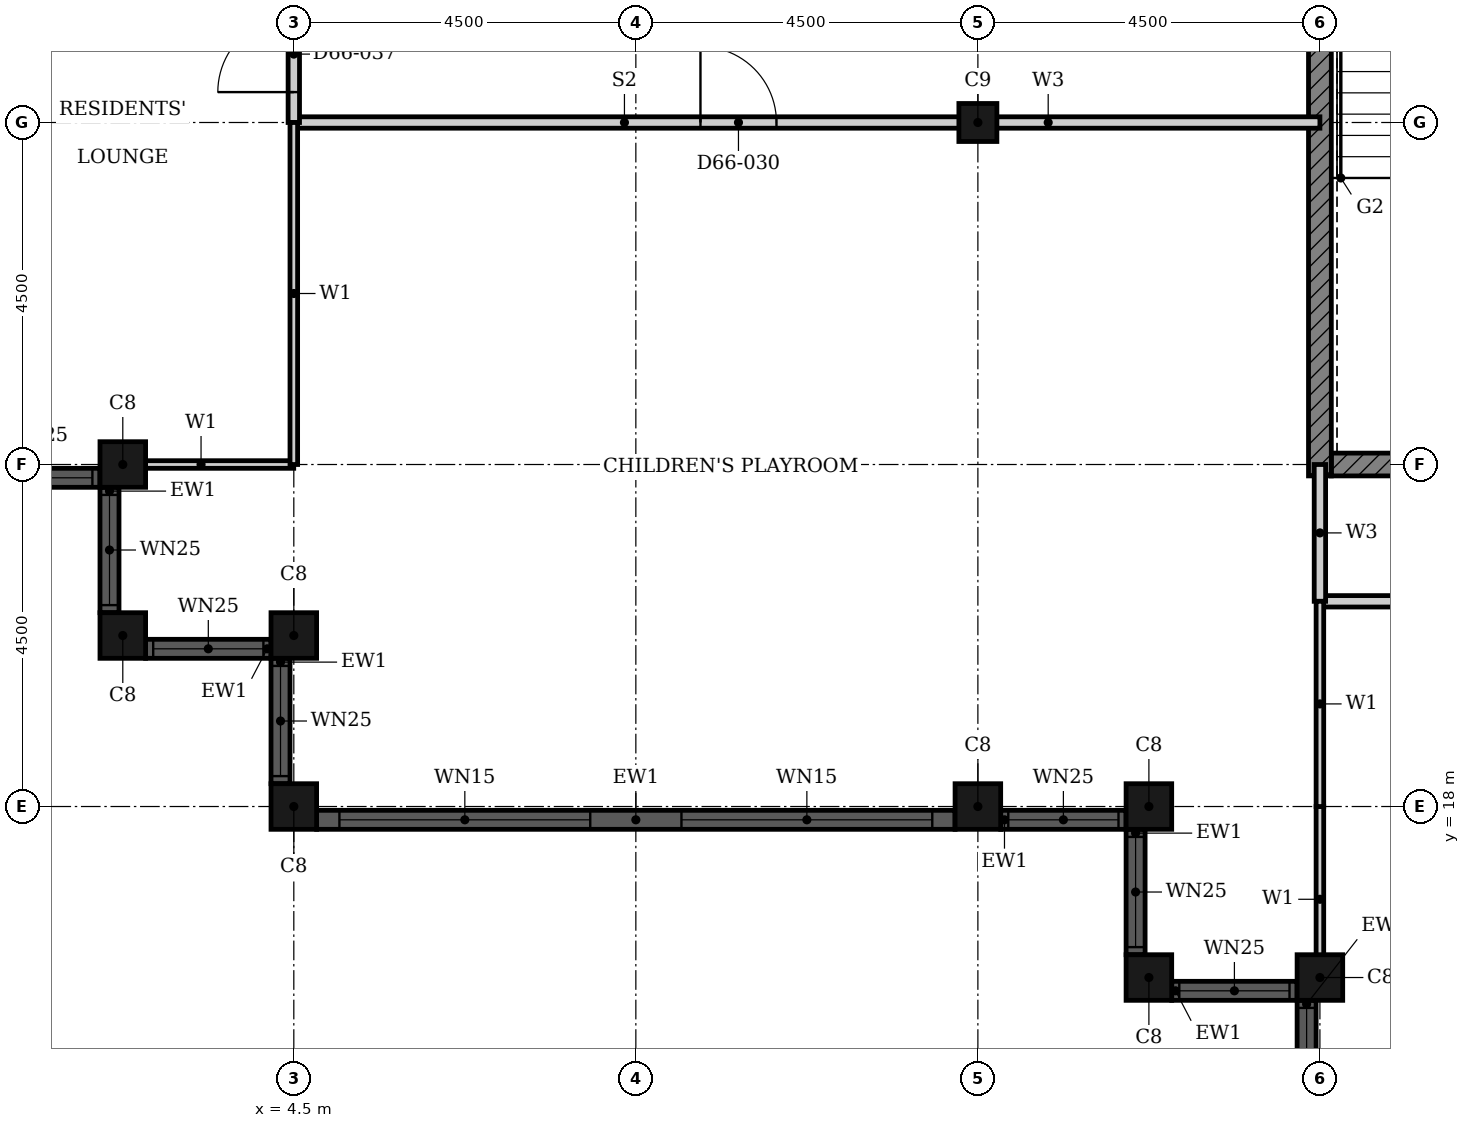
"""IFC4 building model, lengths in metres.
Left out: names, types, materials, properties, quantities, classifications, styles, units other than length and angle.
Written with IfcOpenShell. Run it as: python <this file> out.ifc"""

import sys

from ifc_helpers import new_model, si_unit, direction, frame, frame_2d, origin, origin_2d, place, context, subcontext, project, spatial, rectangle, hollow_rectangle, extrude, element, fill, save


model = new_model("IFC4")
c1 = context("Model", 3, precision=1e-05, world=origin(), true_north=direction((0.0, 1.0)))
c2 = subcontext(c1, "Body", "Model", "MODEL_VIEW")
j1 = project(units=[si_unit("LENGTHUNIT", "METRE"), si_unit("PLANEANGLEUNIT", "RADIAN")], contexts=[c1])
p1 = place(None, origin())
s1 = spatial("IfcSite", under=j1, at=p1, CompositionType="ELEMENT")
p2 = place(p1, origin())
s2 = spatial("IfcBuilding", under=s1, at=p2, CompositionType="ELEMENT")
p3 = place(p2, frame((0.0, 0.0, 260.1)))
s3 = spatial("IfcBuildingStorey", under=s2, at=p3, CompositionType="ELEMENT", Elevation=260.1)
for number, where, z_axis, x_axis in (
    (1, (15.75, 18.0, 0.0), (0.0, 0.0, 1.0), (1.0, 0.0, 0.0)),
    (2, (15.75, 15.75, 0.0), (0.0, 0.0, 1.0), (1.0, 0.0, 0.0)),
    (3, (18.0, 15.75, 0.0), (0.0, 0.0, 1.0), (1.0, 0.0, 0.0)),
    (4, (2.25, 22.5, 0.0), (0.0, 0.0, 1.0), (1.0, 0.0, 0.0)),
    (5, (2.25, 20.25, 0.0), (0.0, 0.0, 1.0), (1.0, 0.0, 0.0)),
    (6, (4.5, 20.25, 0.0), (0.0, 0.0, 1.0), (1.0, 0.0, 0.0)),
    (7, (4.5, 18.0, 0.0), (0.0, 0.0, 1.0), (1.0, 0.0, 0.0)),
    (8, (13.5, 18.0, 0.0), (0.0, 0.0, 1.0), (1.0, 0.0, 0.0)),
):
    element("IfcColumn", number, at=place(p3, frame(where, z_axis=z_axis, x_axis=x_axis)), inside=s3, PredefinedType="COLUMN", context=c2, shape_type="SweptSolid", body=[
        extrude(hollow_rectangle(XDim=0.6, YDim=0.6, WallThickness=0.02, at=origin_2d()), origin(), (0.0, 0.0, 1.0), 3.7),
    ])
p4 = place(p3, frame((13.5, 27.0, 0.0), z_axis=(0.0, 0.0, 1.0), x_axis=(1.0, 0.0, 0.0)))
e9 = element("IfcColumn", 9, at=p4, inside=s3, PredefinedType="COLUMN", context=c2, shape_type="SweptSolid", body=[
    extrude(hollow_rectangle(XDim=0.5, YDim=0.5, WallThickness=0.016, InnerFilletRadius=0.032, OuterFilletRadius=0.048, at=origin_2d()), origin(), (0.0, 0.0, 1.0), 3.7),
])
p5 = place(p3, frame((15.575, 17.7, 0.0), z_axis=(0.0, 0.0, 1.0), x_axis=(0.0, -1.0, 0.0)))
e10 = element("IfcWall", 10, at=p5, inside=s3, PredefinedType="SOLIDWALL", context=c2, shape_type="SweptSolid", body=[
    extrude(rectangle(XDim=1.65, YDim=0.25, at=frame_2d((0.825, 0.0))), origin(), (0.0, 0.0, 1.0), 3.7),
])
p6 = place(p5, frame((0.1, 0.0, 0.9)))
e11 = element("IfcOpeningElement", 11, at=p6, cuts=e10, PredefinedType="OPENING", context=c2, shape_type="SweptSolid", body=[
    extrude(rectangle(XDim=1.45, YDim=1.85, at=frame_2d((0.725, 0.925))), frame((0.0, 0.135, 0.0), z_axis=(0.0, -1.0, 0.0), x_axis=(1.0, 0.0, 0.0)), (0.0, 0.0, 1.0), 0.27),
])
p7 = place(p3, frame((16.05, 15.575, 0.0), z_axis=(0.0, 0.0, 1.0), x_axis=(1.0, 0.0, 0.0)))
e12 = element("IfcWall", 12, at=p7, inside=s3, PredefinedType="SOLIDWALL", context=c2, shape_type="SweptSolid", body=[
    extrude(rectangle(XDim=1.65, YDim=0.25, at=frame_2d((0.825, 0.0))), origin(), (0.0, 0.0, 1.0), 3.7),
])
p8 = place(p7, frame((0.1, 0.0, 0.9)))
e13 = element("IfcOpeningElement", 13, at=p8, cuts=e12, PredefinedType="OPENING", context=c2, shape_type="SweptSolid", body=[
    extrude(rectangle(XDim=1.45, YDim=1.85, at=frame_2d((0.725, 0.925))), frame((0.0, 0.135, 0.0), z_axis=(0.0, -1.0, 0.0), x_axis=(1.0, 0.0, 0.0)), (0.0, 0.0, 1.0), 0.27),
])
p9 = place(p3, frame((17.825, 15.45, 0.0), z_axis=(0.0, 0.0, 1.0), x_axis=(0.0, -1.0, 0.0)))
e14 = element("IfcWall", 14, at=p9, inside=s3, PredefinedType="SOLIDWALL", context=c2, shape_type="SweptSolid", body=[
    extrude(rectangle(XDim=1.65, YDim=0.25, at=frame_2d((0.825, 0.0))), origin(), (0.0, 0.0, 1.0), 3.7),
])
p10 = place(p9, frame((0.1, 0.0, 0.9)))
e15 = element("IfcOpeningElement", 15, at=p10, cuts=e14, PredefinedType="OPENING", context=c2, shape_type="SweptSolid", body=[
    extrude(rectangle(XDim=1.45, YDim=1.85, at=frame_2d((0.725, 0.925))), frame((0.0, 0.135, 0.0), z_axis=(0.0, -1.0, 0.0), x_axis=(1.0, 0.0, 0.0)), (0.0, 0.0, 1.0), 0.27),
])
p11 = place(p3, frame((0.3, 22.325, 0.0), z_axis=(0.0, 0.0, 1.0), x_axis=(1.0, 0.0, 0.0)))
e16 = element("IfcWall", 16, at=p11, inside=s3, PredefinedType="SOLIDWALL", context=c2, shape_type="SweptSolid", body=[
    extrude(rectangle(XDim=1.65, YDim=0.25, at=frame_2d((0.825, 0.0))), origin(), (0.0, 0.0, 1.0), 3.7),
])
p12 = place(p11, frame((0.1, 0.0, 0.9)))
e17 = element("IfcOpeningElement", 17, at=p12, cuts=e16, PredefinedType="OPENING", context=c2, shape_type="SweptSolid", body=[
    extrude(rectangle(XDim=1.45, YDim=1.85, at=frame_2d((0.725, 0.925))), frame((0.0, 0.135, 0.0), z_axis=(0.0, -1.0, 0.0), x_axis=(1.0, 0.0, 0.0)), (0.0, 0.0, 1.0), 0.27),
])
p13 = place(p3, frame((2.075, 22.2, 0.0), z_axis=(0.0, 0.0, 1.0), x_axis=(0.0, -1.0, 0.0)))
e18 = element("IfcWall", 18, at=p13, inside=s3, PredefinedType="SOLIDWALL", context=c2, shape_type="SweptSolid", body=[
    extrude(rectangle(XDim=1.65, YDim=0.25, at=frame_2d((0.825, 0.0))), origin(), (0.0, 0.0, 1.0), 3.7),
])
p14 = place(p13, frame((0.1, 0.0, 0.9)))
e19 = element("IfcOpeningElement", 19, at=p14, cuts=e18, PredefinedType="OPENING", context=c2, shape_type="SweptSolid", body=[
    extrude(rectangle(XDim=1.45, YDim=1.85, at=frame_2d((0.725, 0.925))), frame((0.0, 0.135, 0.0), z_axis=(0.0, -1.0, 0.0), x_axis=(1.0, 0.0, 0.0)), (0.0, 0.0, 1.0), 0.27),
])
p15 = place(p3, frame((2.55, 20.075, 0.0), z_axis=(0.0, 0.0, 1.0), x_axis=(1.0, 0.0, 0.0)))
e20 = element("IfcWall", 20, at=p15, inside=s3, PredefinedType="SOLIDWALL", context=c2, shape_type="SweptSolid", body=[
    extrude(rectangle(XDim=1.65, YDim=0.25, at=frame_2d((0.825, 0.0))), origin(), (0.0, 0.0, 1.0), 3.7),
])
p16 = place(p15, frame((0.1, 0.0, 0.9)))
e21 = element("IfcOpeningElement", 21, at=p16, cuts=e20, PredefinedType="OPENING", context=c2, shape_type="SweptSolid", body=[
    extrude(rectangle(XDim=1.45, YDim=1.85, at=frame_2d((0.725, 0.925))), frame((0.0, 0.135, 0.0), z_axis=(0.0, -1.0, 0.0), x_axis=(1.0, 0.0, 0.0)), (0.0, 0.0, 1.0), 0.27),
])
p17 = place(p3, frame((4.325, 19.95, 0.0), z_axis=(0.0, 0.0, 1.0), x_axis=(0.0, -1.0, 0.0)))
e22 = element("IfcWall", 22, at=p17, inside=s3, PredefinedType="SOLIDWALL", context=c2, shape_type="SweptSolid", body=[
    extrude(rectangle(XDim=1.65, YDim=0.25, at=frame_2d((0.825, 0.0))), origin(), (0.0, 0.0, 1.0), 3.7),
])
p18 = place(p17, frame((0.1, 0.0, 0.9)))
e23 = element("IfcOpeningElement", 23, at=p18, cuts=e22, PredefinedType="OPENING", context=c2, shape_type="SweptSolid", body=[
    extrude(rectangle(XDim=1.45, YDim=1.85, at=frame_2d((0.725, 0.925))), frame((0.0, 0.135, 0.0), z_axis=(0.0, -1.0, 0.0), x_axis=(1.0, 0.0, 0.0)), (0.0, 0.0, 1.0), 0.27),
])
p19 = place(p3, frame((4.8, 17.825, 0.0), z_axis=(0.0, 0.0, 1.0), x_axis=(1.0, 0.0, 0.0)))
e24 = element("IfcWall", 24, at=p19, inside=s3, PredefinedType="SOLIDWALL", context=c2, shape_type="SweptSolid", body=[
    extrude(rectangle(XDim=8.4, YDim=0.25, at=frame_2d((4.2, 0.0))), origin(), (0.0, 0.0, 1.0), 3.7),
])
p20 = place(p19, frame((0.3, 0.0, 0.45)))
e25 = element("IfcOpeningElement", 25, at=p20, cuts=e24, PredefinedType="OPENING", context=c2, shape_type="SweptSolid", body=[
    extrude(rectangle(XDim=3.3, YDim=2.3, at=frame_2d((1.65, 1.15))), frame((0.0, 0.135, 0.0), z_axis=(0.0, -1.0, 0.0), x_axis=(1.0, 0.0, 0.0)), (0.0, 0.0, 1.0), 0.27),
])
p21 = place(p19, frame((4.8, 0.0, 0.45)))
e26 = element("IfcOpeningElement", 26, at=p21, cuts=e24, PredefinedType="OPENING", context=c2, shape_type="SweptSolid", body=[
    extrude(rectangle(XDim=3.3, YDim=2.3, at=frame_2d((1.65, 1.15))), frame((0.0, 0.135, 0.0), z_axis=(0.0, -1.0, 0.0), x_axis=(1.0, 0.0, 0.0)), (0.0, 0.0, 1.0), 0.27),
])
p22 = place(p3, frame((13.8, 17.825, 0.0), z_axis=(0.0, 0.0, 1.0), x_axis=(1.0, 0.0, 0.0)))
e27 = element("IfcWall", 27, at=p22, inside=s3, PredefinedType="SOLIDWALL", context=c2, shape_type="SweptSolid", body=[
    extrude(rectangle(XDim=1.65, YDim=0.25, at=frame_2d((0.825, 0.0))), origin(), (0.0, 0.0, 1.0), 3.7),
])
p23 = place(p22, frame((0.1, 0.0, 0.9)))
e28 = element("IfcOpeningElement", 28, at=p23, cuts=e27, PredefinedType="OPENING", context=c2, shape_type="SweptSolid", body=[
    extrude(rectangle(XDim=1.45, YDim=1.85, at=frame_2d((0.725, 0.925))), frame((0.0, 0.135, 0.0), z_axis=(0.0, -1.0, 0.0), x_axis=(1.0, 0.0, 0.0)), (0.0, 0.0, 1.0), 0.27),
])
p24 = place(p3, frame((18.15, 22.5, 0.0), z_axis=(0.0, 0.0, 1.0), x_axis=(1.0, 0.0, 0.0)))
e29 = element("IfcWall", 29, at=p24, inside=s3, PredefinedType="SHEAR", context=c2, shape_type="SweptSolid", body=[
    extrude(rectangle(XDim=4.225, YDim=0.3, at=frame_2d((2.113, 0.0))), origin(), (0.0, 0.0, 1.0), 3.4),
])
p25 = place(p3, frame((18.0, 22.35, 0.0), z_axis=(0.0, 0.0, 1.0), x_axis=(0.0, 1.0, 0.0)))
e30 = element("IfcWall", 30, at=p25, inside=s3, PredefinedType="SHEAR", context=c2, shape_type="SweptSolid", body=[
    extrude(rectangle(XDim=9.3, YDim=0.3, at=frame_2d((4.65, 0.0))), origin(), (0.0, 0.0, 1.0), 3.4),
])
p26 = place(p3, frame((18.0, 20.7, 0.0), z_axis=(0.0, 0.0, 1.0), x_axis=(1.0, 0.0, 0.0)))
e31 = element("IfcWall", 31, at=p26, inside=s3, PredefinedType="PARTITIONING", context=c2, shape_type="SweptSolid", body=[
    extrude(rectangle(XDim=24.6, YDim=0.15, at=frame_2d((12.3, 0.0))), origin(), (0.0, 0.0, 1.0), 3.4),
])
p27 = place(p26, frame((4.0, 0.0, 0.0)))
e32 = element("IfcOpeningElement", 32, at=p27, cuts=e31, PredefinedType="OPENING", context=c2, shape_type="SweptSolid", body=[
    extrude(rectangle(XDim=1.0, YDim=2.1, at=frame_2d((0.5, 1.05))), frame((0.0, 0.085, 0.0), z_axis=(0.0, -1.0, 0.0), x_axis=(1.0, 0.0, 0.0)), (0.0, 0.0, 1.0), 0.17),
])
p28 = place(p26, frame((13.0, 0.0, 0.0)))
e33 = element("IfcOpeningElement", 33, at=p28, cuts=e31, PredefinedType="OPENING", context=c2, shape_type="SweptSolid", body=[
    extrude(rectangle(XDim=1.0, YDim=2.1, at=frame_2d((0.5, 1.05))), frame((0.0, 0.085, 0.0), z_axis=(0.0, -1.0, 0.0), x_axis=(1.0, 0.0, 0.0)), (0.0, 0.0, 1.0), 0.17),
])
p29 = place(p26, frame((22.3, 0.0, 0.0)))
e34 = element("IfcOpeningElement", 34, at=p29, cuts=e31, PredefinedType="OPENING", context=c2, shape_type="SweptSolid", body=[
    extrude(rectangle(XDim=1.0, YDim=2.2, at=frame_2d((0.5, 1.1))), frame((0.0, 0.085, 0.0), z_axis=(0.0, -1.0, 0.0), x_axis=(1.0, 0.0, 0.0)), (0.0, 0.0, 1.0), 0.17),
])
p30 = place(p3, frame((4.5, 27.0, 0.0), z_axis=(0.0, 0.0, 1.0), x_axis=(1.0, 0.0, 0.0)))
e35 = element("IfcWall", 35, at=p30, inside=s3, PredefinedType="PARTITIONING", context=c2, shape_type="SweptSolid", body=[
    extrude(rectangle(XDim=13.5, YDim=0.15, at=frame_2d((6.75, 0.0))), origin(), (0.0, 0.0, 1.0), 2.68),
])
p31 = place(p30, frame((5.35, 0.0, 0.0)))
e36 = element("IfcOpeningElement", 36, at=p31, cuts=e35, PredefinedType="OPENING", context=c2, shape_type="SweptSolid", body=[
    extrude(rectangle(XDim=1.0, YDim=2.1, at=frame_2d((0.5, 1.05))), frame((0.0, 0.085, 0.0), z_axis=(0.0, -1.0, 0.0), x_axis=(1.0, 0.0, 0.0)), (0.0, 0.0, 1.0), 0.17),
])
p32 = place(p3, frame((18.0, 20.7, 0.0), z_axis=(0.0, 0.0, 1.0), x_axis=(0.0, 1.0, 0.0)))
e37 = element("IfcWall", 37, at=p32, inside=s3, PredefinedType="PARTITIONING", context=c2, shape_type="SweptSolid", body=[
    extrude(rectangle(XDim=1.8, YDim=0.15, at=frame_2d((0.9, 0.0))), origin(), (0.0, 0.0, 1.0), 3.4),
])
p33 = place(p3, frame((4.5, 27.0, 0.0), z_axis=(0.0, 0.0, 1.0), x_axis=(0.0, 1.0, 0.0)))
e38 = element("IfcWall", 38, at=p33, inside=s3, PredefinedType="PARTITIONING", context=c2, shape_type="SweptSolid", body=[
    extrude(rectangle(XDim=1.8, YDim=0.15, at=frame_2d((0.9, 0.0))), origin(), (0.0, 0.0, 1.0), 3.4),
])
p34 = place(p33, frame((0.4, 0.0, 0.0)))
e39 = element("IfcOpeningElement", 39, at=p34, cuts=e38, PredefinedType="OPENING", context=c2, shape_type="SweptSolid", body=[
    extrude(rectangle(XDim=1.0, YDim=2.1, at=frame_2d((0.5, 1.05))), frame((0.0, 0.085, 0.0), z_axis=(0.0, -1.0, 0.0), x_axis=(1.0, 0.0, 0.0)), (0.0, 0.0, 1.0), 0.17),
])
p35 = place(p3, frame((2.06, 22.5, 0.0), z_axis=(0.0, 0.0, 1.0), x_axis=(1.0, 0.0, 0.0)))
e40 = element("IfcWall", 40, at=p35, inside=s3, PredefinedType="PARTITIONING", context=c2, shape_type="SweptSolid", body=[
    extrude(rectangle(XDim=2.439, YDim=0.1, at=frame_2d((1.219, 0.0))), origin(), (0.0, 0.0, 1.0), 2.68),
])
p36 = place(p3, frame((18.0, 15.56, 0.0), z_axis=(0.0, 0.0, 1.0), x_axis=(0.0, 1.0, 0.0)))
e41 = element("IfcWall", 41, at=p36, inside=s3, PredefinedType="PARTITIONING", context=c2, shape_type="SweptSolid", body=[
    extrude(rectangle(XDim=2.439, YDim=0.1, at=frame_2d((1.219, 0.0))), origin(), (0.0, 0.0, 1.0), 3.4),
])
p37 = place(p3, frame((18.0, 18.0, 0.0), z_axis=(0.0, 0.0, 1.0), x_axis=(0.0, 1.0, 0.0)))
e42 = element("IfcWall", 42, at=p37, inside=s3, PredefinedType="PARTITIONING", context=c2, shape_type="SweptSolid", body=[
    extrude(rectangle(XDim=2.7, YDim=0.1, at=frame_2d((1.35, 0.0))), origin(), (0.0, 0.0, 1.0), 3.4),
])
p38 = place(p3, frame((4.5, 22.5, 0.0), z_axis=(0.0, 0.0, 1.0), x_axis=(0.0, 1.0, 0.0)))
e43 = element("IfcWall", 43, at=p38, inside=s3, PredefinedType="PARTITIONING", context=c2, shape_type="SweptSolid", body=[
    extrude(rectangle(XDim=4.5, YDim=0.1, at=frame_2d((2.25, 0.0))), origin(), (0.0, 0.0, 1.0), 3.4),
])
p39 = place(p6, origin())
e44 = element("IfcWindow", 44, at=p39, inside=s3, PartitioningType="SINGLE_PANEL", PredefinedType="WINDOW", context=c2, shape_type="SweptSolid", body=[
    extrude(rectangle(XDim=1.45, YDim=1.85, at=frame_2d((0.725, 0.925))), frame((0.0, 0.03, 0.0), z_axis=(0.0, -1.0, 0.0), x_axis=(1.0, 0.0, 0.0)), (0.0, 0.0, 1.0), 0.06),
])
fill(e11, e44)
p40 = place(p8, origin())
e45 = element("IfcWindow", 45, at=p40, inside=s3, PartitioningType="SINGLE_PANEL", PredefinedType="WINDOW", context=c2, shape_type="SweptSolid", body=[
    extrude(rectangle(XDim=1.45, YDim=1.85, at=frame_2d((0.725, 0.925))), frame((0.0, 0.03, 0.0), z_axis=(0.0, -1.0, 0.0), x_axis=(1.0, 0.0, 0.0)), (0.0, 0.0, 1.0), 0.06),
])
fill(e13, e45)
p41 = place(p10, origin())
e46 = element("IfcWindow", 46, at=p41, inside=s3, PartitioningType="SINGLE_PANEL", PredefinedType="WINDOW", context=c2, shape_type="SweptSolid", body=[
    extrude(rectangle(XDim=1.45, YDim=1.85, at=frame_2d((0.725, 0.925))), frame((0.0, 0.03, 0.0), z_axis=(0.0, -1.0, 0.0), x_axis=(1.0, 0.0, 0.0)), (0.0, 0.0, 1.0), 0.06),
])
fill(e15, e46)
p42 = place(p12, origin())
e47 = element("IfcWindow", 47, at=p42, inside=s3, PartitioningType="SINGLE_PANEL", PredefinedType="WINDOW", context=c2, shape_type="SweptSolid", body=[
    extrude(rectangle(XDim=1.45, YDim=1.85, at=frame_2d((0.725, 0.925))), frame((0.0, 0.03, 0.0), z_axis=(0.0, -1.0, 0.0), x_axis=(1.0, 0.0, 0.0)), (0.0, 0.0, 1.0), 0.06),
])
fill(e17, e47)
p43 = place(p14, origin())
e48 = element("IfcWindow", 48, at=p43, inside=s3, PartitioningType="SINGLE_PANEL", PredefinedType="WINDOW", context=c2, shape_type="SweptSolid", body=[
    extrude(rectangle(XDim=1.45, YDim=1.85, at=frame_2d((0.725, 0.925))), frame((0.0, 0.03, 0.0), z_axis=(0.0, -1.0, 0.0), x_axis=(1.0, 0.0, 0.0)), (0.0, 0.0, 1.0), 0.06),
])
fill(e19, e48)
p44 = place(p16, origin())
e49 = element("IfcWindow", 49, at=p44, inside=s3, PartitioningType="SINGLE_PANEL", PredefinedType="WINDOW", context=c2, shape_type="SweptSolid", body=[
    extrude(rectangle(XDim=1.45, YDim=1.85, at=frame_2d((0.725, 0.925))), frame((0.0, 0.03, 0.0), z_axis=(0.0, -1.0, 0.0), x_axis=(1.0, 0.0, 0.0)), (0.0, 0.0, 1.0), 0.06),
])
fill(e21, e49)
p45 = place(p18, origin())
e50 = element("IfcWindow", 50, at=p45, inside=s3, PartitioningType="SINGLE_PANEL", PredefinedType="WINDOW", context=c2, shape_type="SweptSolid", body=[
    extrude(rectangle(XDim=1.45, YDim=1.85, at=frame_2d((0.725, 0.925))), frame((0.0, 0.03, 0.0), z_axis=(0.0, -1.0, 0.0), x_axis=(1.0, 0.0, 0.0)), (0.0, 0.0, 1.0), 0.06),
])
fill(e23, e50)
p46 = place(p20, origin())
e51 = element("IfcWindow", 51, at=p46, inside=s3, PartitioningType="SINGLE_PANEL", PredefinedType="WINDOW", context=c2, shape_type="SweptSolid", body=[
    extrude(rectangle(XDim=3.3, YDim=2.3, at=frame_2d((1.65, 1.15))), frame((0.0, 0.03, 0.0), z_axis=(0.0, -1.0, 0.0), x_axis=(1.0, 0.0, 0.0)), (0.0, 0.0, 1.0), 0.06),
])
fill(e25, e51)
p47 = place(p21, origin())
e52 = element("IfcWindow", 52, at=p47, inside=s3, PartitioningType="SINGLE_PANEL", PredefinedType="WINDOW", context=c2, shape_type="SweptSolid", body=[
    extrude(rectangle(XDim=3.3, YDim=2.3, at=frame_2d((1.65, 1.15))), frame((0.0, 0.03, 0.0), z_axis=(0.0, -1.0, 0.0), x_axis=(1.0, 0.0, 0.0)), (0.0, 0.0, 1.0), 0.06),
])
fill(e26, e52)
p48 = place(p23, origin())
e53 = element("IfcWindow", 53, at=p48, inside=s3, PartitioningType="SINGLE_PANEL", PredefinedType="WINDOW", context=c2, shape_type="SweptSolid", body=[
    extrude(rectangle(XDim=1.45, YDim=1.85, at=frame_2d((0.725, 0.925))), frame((0.0, 0.03, 0.0), z_axis=(0.0, -1.0, 0.0), x_axis=(1.0, 0.0, 0.0)), (0.0, 0.0, 1.0), 0.06),
])
fill(e28, e53)
p49 = place(p31, origin())
e54 = element("IfcDoor", 54, at=p49, inside=s3, OperationType="SINGLE_SWING_LEFT", PredefinedType="DOOR", context=c2, shape_type="SweptSolid", body=[
    extrude(rectangle(XDim=1.0, YDim=2.1, at=frame_2d((0.5, 1.05))), frame((0.0, 0.025, 0.0), z_axis=(0.0, -1.0, 0.0), x_axis=(1.0, 0.0, 0.0)), (0.0, 0.0, 1.0), 0.05),
])
fill(e36, e54)
p50 = place(p34, origin())
e55 = element("IfcDoor", 55, at=p50, inside=s3, OperationType="SINGLE_SWING_RIGHT", PredefinedType="DOOR", context=c2, shape_type="SweptSolid", body=[
    extrude(rectangle(XDim=1.0, YDim=2.1, at=frame_2d((0.5, 1.05))), frame((0.0, 0.025, 0.0), z_axis=(0.0, -1.0, 0.0), x_axis=(1.0, 0.0, 0.0)), (0.0, 0.0, 1.0), 0.05),
])
fill(e39, e55)
save(model, sys.argv[1])
